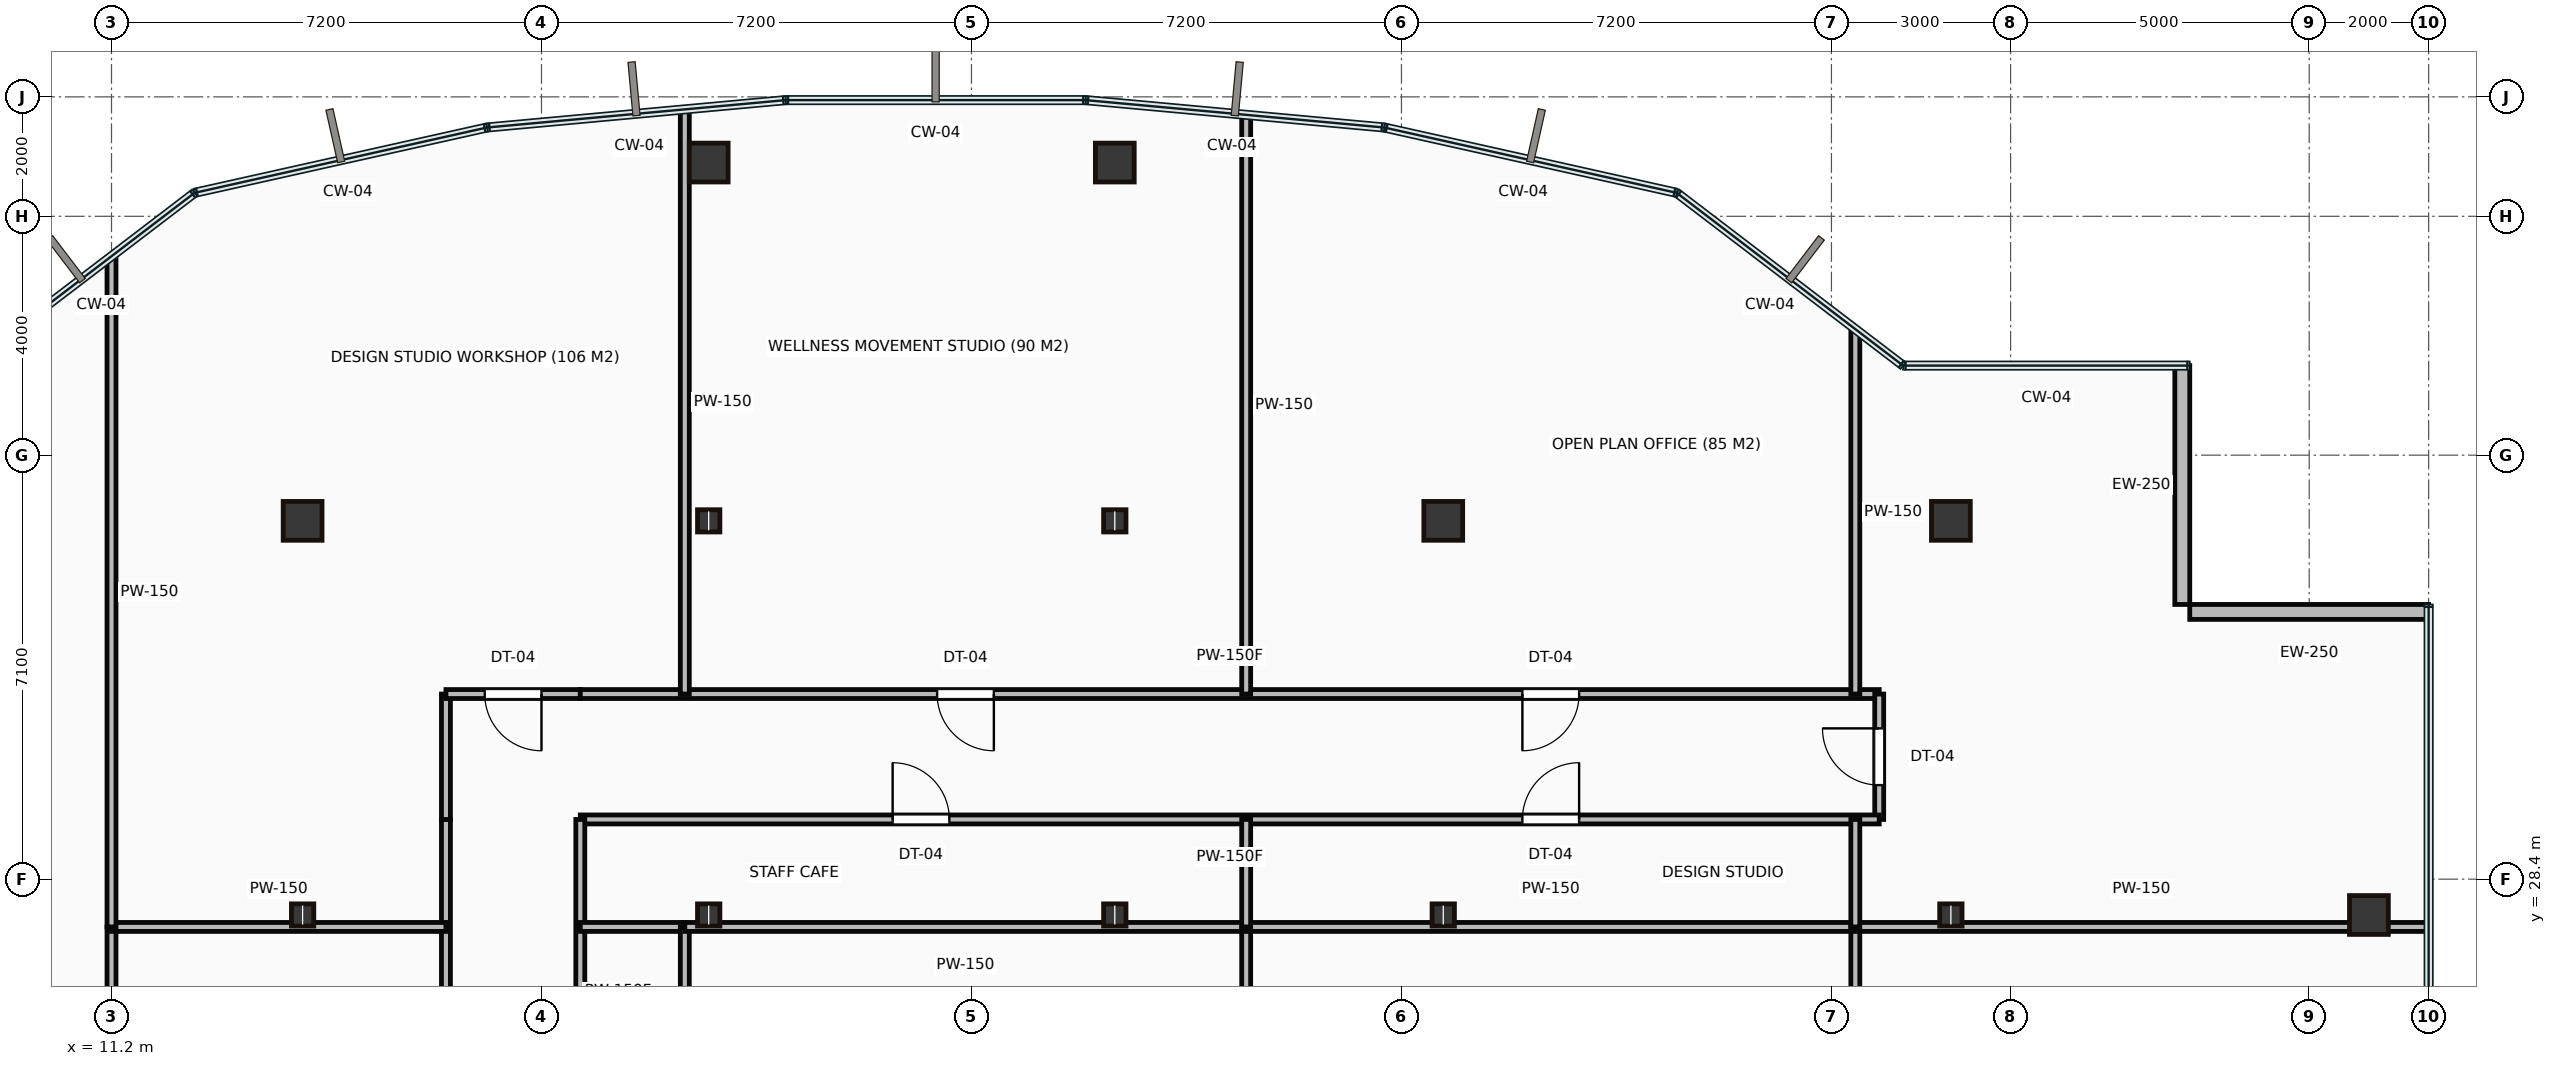
"""IFC4 building model, lengths in metres.
Left out: names, types, materials, properties, quantities, classifications, styles, units other than length and angle.
Written with IfcOpenShell. Run it as: python <this file> out.ifc"""

import sys

from ifc_helpers import new_model, si_unit, direction, frame, frame_2d, origin, origin_2d, place, context, subcontext, project, spatial, rectangle, hollow_rectangle, i_section, extrude, source, transform, mapped, element, fill, save


model = new_model("IFC4")
c1 = context("Model", 3, precision=1e-05, world=origin(), true_north=direction((0.0, 1.0)))
c2 = subcontext(c1, "Body", "Model", "MODEL_VIEW")
j1 = project(units=[si_unit("LENGTHUNIT", "METRE"), si_unit("PLANEANGLEUNIT", "RADIAN")], contexts=[c1])
p1 = place(None, origin())
s1 = spatial("IfcSite", under=j1, at=p1, CompositionType="ELEMENT")
p2 = place(p1, origin())
s2 = spatial("IfcBuilding", under=s1, at=p2, CompositionType="ELEMENT")
p3 = place(p2, frame((0.0, 0.0, 144.25)))
s3 = spatial("IfcBuildingStorey", under=s2, at=p3, CompositionType="ELEMENT", Elevation=144.25)
m1 = source(origin(), c2, "Body", "SweptSolid", [
    extrude(i_section(OverallWidth=0.374, OverallDepth=0.372, WebThickness=0.016, FlangeThickness=0.026, at=origin_2d()), origin(), (0.0, 0.0, 1.0), 3.65),
])
p4 = place(p3, frame((14.4, 27.8, 0.0), z_axis=(0.0, 0.0, 1.0), x_axis=(1.0, 0.0, 0.0)))
e1 = element("IfcColumn", 1, at=p4, inside=s3, PredefinedType="COLUMN", context=c2, shape_type="MappedRepresentation", body=[
    mapped(m1, transform((0.0, 0.0, 0.0))),
])
m2 = source(origin(), c2, "Body", "SweptSolid", [
    extrude(hollow_rectangle(XDim=0.65, YDim=0.65, WallThickness=0.032, at=origin_2d()), origin(), (0.0, 0.0, 1.0), 3.65),
])
p5 = place(p3, frame((14.4, 34.4, 0.0), z_axis=(0.0, 0.0, 1.0), x_axis=(1.0, 0.0, 0.0)))
e2 = element("IfcColumn", 2, at=p5, inside=s3, PredefinedType="COLUMN", context=c2, shape_type="MappedRepresentation", body=[
    mapped(m2, transform((0.0, 0.0, 0.0))),
])
for number, where, z_axis, x_axis in (
    (3, (21.2, 27.8, 0.0), (0.0, 0.0, 1.0), (1.0, 0.0, 0.0)),
    (4, (21.2, 34.4, 0.0), (0.0, 0.0, 1.0), (1.0, 0.0, 0.0)),
):
    element("IfcColumn", number, at=place(p3, frame(where, z_axis=z_axis, x_axis=x_axis)), inside=s3, PredefinedType="COLUMN", context=c2, shape_type="MappedRepresentation", body=[
        mapped(m1, transform((0.0, 0.0, 0.0))),
    ])
p6 = place(p3, frame((21.2, 40.4, 0.0), z_axis=(0.0, 0.0, 1.0), x_axis=(1.0, 0.0, 0.0)))
e5 = element("IfcColumn", 5, at=p6, inside=s3, PredefinedType="COLUMN", context=c2, shape_type="MappedRepresentation", body=[
    mapped(m2, transform((0.0, 0.0, 0.0))),
])
for number, where, z_axis, x_axis in (
    (6, (28.0, 27.8, 0.0), (0.0, 0.0, 1.0), (1.0, 0.0, 0.0)),
    (7, (28.0, 34.4, 0.0), (0.0, 0.0, 1.0), (1.0, 0.0, 0.0)),
):
    element("IfcColumn", number, at=place(p3, frame(where, z_axis=z_axis, x_axis=x_axis)), inside=s3, PredefinedType="COLUMN", context=c2, shape_type="MappedRepresentation", body=[
        mapped(m1, transform((0.0, 0.0, 0.0))),
    ])
p7 = place(p3, frame((28.0, 40.4, 0.0), z_axis=(0.0, 0.0, 1.0), x_axis=(1.0, 0.0, 0.0)))
e8 = element("IfcColumn", 8, at=p7, inside=s3, PredefinedType="COLUMN", context=c2, shape_type="MappedRepresentation", body=[
    mapped(m2, transform((0.0, 0.0, 0.0))),
])
p8 = place(p3, frame((33.5, 27.8, 0.0), z_axis=(0.0, 0.0, 1.0), x_axis=(1.0, 0.0, 0.0)))
e9 = element("IfcColumn", 9, at=p8, inside=s3, PredefinedType="COLUMN", context=c2, shape_type="MappedRepresentation", body=[
    mapped(m1, transform((0.0, 0.0, 0.0))),
])
p9 = place(p3, frame((33.5, 34.4, 0.0), z_axis=(0.0, 0.0, 1.0), x_axis=(1.0, 0.0, 0.0)))
e10 = element("IfcColumn", 10, at=p9, inside=s3, PredefinedType="COLUMN", context=c2, shape_type="MappedRepresentation", body=[
    mapped(m2, transform((0.0, 0.0, 0.0))),
])
p10 = place(p3, frame((42.0, 27.8, 0.0), z_axis=(0.0, 0.0, 1.0), x_axis=(1.0, 0.0, 0.0)))
e11 = element("IfcColumn", 11, at=p10, inside=s3, PredefinedType="COLUMN", context=c2, shape_type="MappedRepresentation", body=[
    mapped(m1, transform((0.0, 0.0, 0.0))),
])
for number, where, z_axis, x_axis in (
    (12, (42.0, 34.4, 0.0), (0.0, 0.0, 1.0), (1.0, 0.0, 0.0)),
    (13, (49.0, 27.8, 0.0), (0.0, 0.0, 1.0), (1.0, 0.0, 0.0)),
):
    element("IfcColumn", number, at=place(p3, frame(where, z_axis=z_axis, x_axis=x_axis)), inside=s3, PredefinedType="COLUMN", context=c2, shape_type="MappedRepresentation", body=[
        mapped(m2, transform((0.0, 0.0, 0.0))),
    ])
m3 = source(origin(), c2, "Body", "SweptSolid", [
    extrude(rectangle(XDim=4.0, YDim=0.25, at=frame_2d((2.0, 0.0))), origin(), (0.0, 0.0, 1.0), 3.4),
])
for number, where, z_axis, x_axis in (
    (14, (50.0, 32.875, 0.0), (0.0, 0.0, 1.0), (-1.0, 0.0, 0.0)),
    (15, (45.875, 33.0, 0.0), (0.0, 0.0, 1.0), (0.0, 1.0, 0.0)),
):
    element("IfcWall", number, at=place(p3, frame(where, z_axis=z_axis, x_axis=x_axis)), inside=s3, PredefinedType="STANDARD", context=c2, shape_type="MappedRepresentation", body=[
        mapped(m3, transform((0.0, 0.0, 0.0))),
    ])
m4 = source(origin(), c2, "Body", "SweptSolid", [
    extrude(rectangle(XDim=13.1, YDim=0.15, at=frame_2d((6.55, 0.0))), origin(), (0.0, 0.0, 1.0), 3.4),
])
p11 = place(p3, frame((16.8, 16.3, 0.0), z_axis=(0.0, 0.0, 1.0), x_axis=(0.0, 1.0, 0.0)))
e16 = element("IfcWall", 16, at=p11, inside=s3, PredefinedType="PARTITIONING", context=c2, shape_type="MappedRepresentation", body=[
    mapped(m4, transform((0.0, 0.0, 0.0))),
])
p12 = place(p11, frame((5.305, 0.0, 0.0)))
e17 = element("IfcOpeningElement", 17, at=p12, cuts=e16, PredefinedType="OPENING", context=c2, shape_type="SweptSolid", body=[
    extrude(rectangle(XDim=0.95, YDim=2.15, at=frame_2d((0.475, 1.075))), frame((0.0, 0.085, 0.0), z_axis=(0.0, -1.0, 0.0), x_axis=(1.0, 0.0, 0.0)), (0.0, 0.0, 1.0), 0.17),
])
m5 = source(origin(), c2, "Body", "SweptSolid", [
    extrude(rectangle(XDim=2.1, YDim=0.15, at=frame_2d((1.05, 0.0))), origin(), (0.0, 0.0, 1.0), 3.4),
])
p13 = place(p3, frame((16.8, 29.4, 0.0), z_axis=(0.0, 0.0, 1.0), x_axis=(0.0, 1.0, 0.0)))
e18 = element("IfcWall", 18, at=p13, inside=s3, PredefinedType="PARTITIONING", context=c2, shape_type="MappedRepresentation", body=[
    mapped(m5, transform((0.0, 0.0, 0.0))),
])
m6 = source(origin(), c2, "Body", "SweptSolid", [
    extrude(rectangle(XDim=2.25, YDim=0.15, at=frame_2d((1.125, 0.0))), origin(), (0.0, 0.0, 1.0), 3.4),
])
p14 = place(p3, frame((16.8, 31.5, 0.0), z_axis=(0.0, 0.0, 1.0), x_axis=(1.0, 0.0, 0.0)))
e19 = element("IfcWall", 19, at=p14, inside=s3, PredefinedType="PARTITIONING", context=c2, shape_type="MappedRepresentation", body=[
    mapped(m6, transform((0.0, 0.0, 0.0))),
])
p15 = place(p14, frame((0.65, 0.0, 0.0)))
e20 = element("IfcOpeningElement", 20, at=p15, cuts=e19, PredefinedType="OPENING", context=c2, shape_type="SweptSolid", body=[
    extrude(rectangle(XDim=0.95, YDim=2.15, at=frame_2d((0.475, 1.075))), frame((0.0, 0.085, 0.0), z_axis=(0.0, -1.0, 0.0), x_axis=(1.0, 0.0, 0.0)), (0.0, 0.0, 1.0), 0.17),
])
m7 = source(origin(), c2, "Body", "SweptSolid", [
    extrude(rectangle(XDim=21.75, YDim=0.15, at=frame_2d((10.875, 0.0))), origin(), (0.0, 0.0, 1.0), 3.4),
])
p16 = place(p3, frame((19.05, 31.5, 0.0), z_axis=(0.0, 0.0, 1.0), x_axis=(1.0, 0.0, 0.0)))
e21 = element("IfcWall", 21, at=p16, inside=s3, PredefinedType="PARTITIONING", context=c2, shape_type="MappedRepresentation", body=[
    mapped(m7, transform((0.0, 0.0, 0.0))),
])
p17 = place(p16, frame((5.975, 0.0, 0.0)))
e22 = element("IfcOpeningElement", 22, at=p17, cuts=e21, PredefinedType="OPENING", context=c2, shape_type="SweptSolid", body=[
    extrude(rectangle(XDim=0.95, YDim=2.15, at=frame_2d((0.475, 1.075))), frame((0.0, 0.085, 0.0), z_axis=(0.0, -1.0, 0.0), x_axis=(1.0, 0.0, 0.0)), (0.0, 0.0, 1.0), 0.17),
])
p18 = place(p16, frame((15.775, 0.0, 0.0)))
e23 = element("IfcOpeningElement", 23, at=p18, cuts=e21, PredefinedType="OPENING", context=c2, shape_type="SweptSolid", body=[
    extrude(rectangle(XDim=0.95, YDim=2.15, at=frame_2d((0.475, 1.075))), frame((0.0, 0.085, 0.0), z_axis=(0.0, -1.0, 0.0), x_axis=(1.0, 0.0, 0.0)), (0.0, 0.0, 1.0), 0.17),
])
p19 = place(p3, frame((40.8, 31.5, 0.0), z_axis=(0.0, 0.0, 1.0), x_axis=(0.0, -1.0, 0.0)))
e24 = element("IfcWall", 24, at=p19, inside=s3, PredefinedType="PARTITIONING", context=c2, shape_type="MappedRepresentation", body=[
    mapped(m5, transform((0.0, 0.0, 0.0))),
])
p20 = place(p19, frame((0.575, 0.0, 0.0)))
e25 = element("IfcOpeningElement", 25, at=p20, cuts=e24, PredefinedType="OPENING", context=c2, shape_type="SweptSolid", body=[
    extrude(rectangle(XDim=0.95, YDim=2.15, at=frame_2d((0.475, 1.075))), frame((0.0, 0.085, 0.0), z_axis=(0.0, -1.0, 0.0), x_axis=(1.0, 0.0, 0.0)), (0.0, 0.0, 1.0), 0.17),
])
p21 = place(p3, frame((40.8, 29.4, 0.0), z_axis=(0.0, 0.0, 1.0), x_axis=(-1.0, 0.0, 0.0)))
e26 = element("IfcWall", 26, at=p21, inside=s3, PredefinedType="PARTITIONING", context=c2, shape_type="MappedRepresentation", body=[
    mapped(m7, transform((0.0, 0.0, 0.0))),
])
p22 = place(p21, frame((15.57, 0.0, 0.0)))
e27 = element("IfcOpeningElement", 27, at=p22, cuts=e26, PredefinedType="OPENING", context=c2, shape_type="SweptSolid", body=[
    extrude(rectangle(XDim=0.95, YDim=2.15, at=frame_2d((0.475, 1.075))), frame((0.0, 0.085, 0.0), z_axis=(0.0, -1.0, 0.0), x_axis=(1.0, 0.0, 0.0)), (0.0, 0.0, 1.0), 0.17),
])
p23 = place(p21, frame((5.025, 0.0, 0.0)))
e28 = element("IfcOpeningElement", 28, at=p23, cuts=e26, PredefinedType="OPENING", context=c2, shape_type="SweptSolid", body=[
    extrude(rectangle(XDim=0.95, YDim=2.15, at=frame_2d((0.475, 1.075))), frame((0.0, 0.085, 0.0), z_axis=(0.0, -1.0, 0.0), x_axis=(1.0, 0.0, 0.0)), (0.0, 0.0, 1.0), 0.17),
])
p24 = place(p3, frame((19.05, 29.4, 0.0), z_axis=(0.0, 0.0, 1.0), x_axis=(0.0, -1.0, 0.0)))
e29 = element("IfcWall", 29, at=p24, inside=s3, PredefinedType="PARTITIONING", context=c2, shape_type="MappedRepresentation", body=[
    mapped(m4, transform((0.0, 0.0, 0.0))),
])
p25 = place(p24, frame((6.845, 0.0, 0.0)))
e30 = element("IfcOpeningElement", 30, at=p25, cuts=e29, PredefinedType="OPENING", context=c2, shape_type="SweptSolid", body=[
    extrude(rectangle(XDim=0.95, YDim=2.15, at=frame_2d((0.475, 1.075))), frame((0.0, 0.085, 0.0), z_axis=(0.0, -1.0, 0.0), x_axis=(1.0, 0.0, 0.0)), (0.0, 0.0, 1.0), 0.17),
])
m8 = source(origin(), c2, "Body", "SweptSolid", [
    extrude(rectangle(XDim=11.3, YDim=0.15, at=frame_2d((5.65, 0.0))), origin(), (0.0, 0.0, 1.0), 3.4),
])
p26 = place(p3, frame((11.2, 27.6, 0.0), z_axis=(0.0, 0.0, 1.0), x_axis=(0.0, -1.0, 0.0)))
e31 = element("IfcWall", 31, at=p26, inside=s3, PredefinedType="PARTITIONING", context=c2, shape_type="MappedRepresentation", body=[
    mapped(m8, transform((0.0, 0.0, 0.0))),
])
m9 = source(origin(), c2, "Body", "SweptSolid", [
    extrude(rectangle(XDim=5.6, YDim=0.15, at=frame_2d((2.8, 0.0))), origin(), (0.0, 0.0, 1.0), 3.4),
])
p27 = place(p3, frame((11.2, 27.6, 0.0), z_axis=(0.0, 0.0, 1.0), x_axis=(1.0, 0.0, 0.0)))
e32 = element("IfcWall", 32, at=p27, inside=s3, PredefinedType="PARTITIONING", context=c2, shape_type="MappedRepresentation", body=[
    mapped(m9, transform((0.0, 0.0, 0.0))),
])
m10 = source(origin(), c2, "Body", "SweptSolid", [
    extrude(rectangle(XDim=11.206, YDim=0.15, at=frame_2d((5.603, 0.0))), origin(), (0.0, 0.0, 1.0), 3.4),
])
p28 = place(p3, frame((11.2, 38.806, 0.0), z_axis=(0.0, 0.0, 1.0), x_axis=(0.0, -1.0, 0.0)))
e33 = element("IfcWall", 33, at=p28, inside=s3, PredefinedType="PARTITIONING", context=c2, shape_type="MappedRepresentation", body=[
    mapped(m10, transform((0.0, 0.0, 0.0))),
])
m11 = source(origin(), c2, "Body", "SweptSolid", [
    extrude(rectangle(XDim=1.75, YDim=0.15, at=frame_2d((0.875, 0.0))), origin(), (0.0, 0.0, 1.0), 3.4),
])
p29 = place(p3, frame((19.05, 27.6, 0.0), z_axis=(0.0, 0.0, 1.0), x_axis=(1.0, 0.0, 0.0)))
e34 = element("IfcWall", 34, at=p29, inside=s3, PredefinedType="PARTITIONING", context=c2, shape_type="MappedRepresentation", body=[
    mapped(m11, transform((0.0, 0.0, 0.0))),
])
p30 = place(p3, frame((20.8, 27.6, 0.0), z_axis=(0.0, 0.0, 1.0), x_axis=(0.0, -1.0, 0.0)))
e35 = element("IfcWall", 35, at=p30, inside=s3, PredefinedType="PARTITIONING", context=c2, shape_type="MappedRepresentation", body=[
    mapped(m8, transform((0.0, 0.0, 0.0))),
])
m12 = source(origin(), c2, "Body", "SweptSolid", [
    extrude(rectangle(XDim=9.4, YDim=0.15, at=frame_2d((4.7, 0.0))), origin(), (0.0, 0.0, 1.0), 3.4),
])
p31 = place(p3, frame((30.2, 27.6, 0.0), z_axis=(0.0, 0.0, 1.0), x_axis=(-1.0, 0.0, 0.0)))
e36 = element("IfcWall", 36, at=p31, inside=s3, PredefinedType="PARTITIONING", context=c2, shape_type="MappedRepresentation", body=[
    mapped(m12, transform((0.0, 0.0, 0.0))),
])
m13 = source(origin(), c2, "Body", "SweptSolid", [
    extrude(rectangle(XDim=9.771, YDim=0.15, at=frame_2d((4.885, 0.0))), origin(), (0.0, 0.0, 1.0), 3.4),
])
p32 = place(p3, frame((20.8, 41.271, 0.0), z_axis=(0.0, 0.0, 1.0), x_axis=(0.0, -1.0, 0.0)))
e37 = element("IfcWall", 37, at=p32, inside=s3, PredefinedType="PARTITIONING", context=c2, shape_type="MappedRepresentation", body=[
    mapped(m13, transform((0.0, 0.0, 0.0))),
])
p33 = place(p3, frame((30.2, 27.6, 0.0), z_axis=(0.0, 0.0, 1.0), x_axis=(0.0, -1.0, 0.0)))
e38 = element("IfcWall", 38, at=p33, inside=s3, PredefinedType="PARTITIONING", context=c2, shape_type="MappedRepresentation", body=[
    mapped(m8, transform((0.0, 0.0, 0.0))),
])
m14 = source(origin(), c2, "Body", "SweptSolid", [
    extrude(rectangle(XDim=10.2, YDim=0.15, at=frame_2d((5.1, 0.0))), origin(), (0.0, 0.0, 1.0), 3.4),
])
p34 = place(p3, frame((30.2, 27.6, 0.0), z_axis=(0.0, 0.0, 1.0), x_axis=(1.0, 0.0, 0.0)))
e39 = element("IfcWall", 39, at=p34, inside=s3, PredefinedType="PARTITIONING", context=c2, shape_type="MappedRepresentation", body=[
    mapped(m14, transform((0.0, 0.0, 0.0))),
])
m15 = source(origin(), c2, "Body", "SweptSolid", [
    extrude(rectangle(XDim=1.8, YDim=0.15, at=frame_2d((0.9, 0.0))), origin(), (0.0, 0.0, 1.0), 3.4),
])
p35 = place(p3, frame((30.2, 29.4, 0.0), z_axis=(0.0, 0.0, 1.0), x_axis=(0.0, -1.0, 0.0)))
e40 = element("IfcWall", 40, at=p35, inside=s3, PredefinedType="PARTITIONING", context=c2, shape_type="MappedRepresentation", body=[
    mapped(m15, transform((0.0, 0.0, 0.0))),
])
m16 = source(origin(), c2, "Body", "SweptSolid", [
    extrude(rectangle(XDim=9.679, YDim=0.15, at=frame_2d((4.839, 0.0))), origin(), (0.0, 0.0, 1.0), 3.4),
])
p36 = place(p3, frame((30.2, 41.179, 0.0), z_axis=(0.0, 0.0, 1.0), x_axis=(0.0, -1.0, 0.0)))
e41 = element("IfcWall", 41, at=p36, inside=s3, PredefinedType="PARTITIONING", context=c2, shape_type="MappedRepresentation", body=[
    mapped(m16, transform((0.0, 0.0, 0.0))),
])
p37 = place(p3, frame((40.4, 27.6, 0.0), z_axis=(0.0, 0.0, 1.0), x_axis=(0.0, -1.0, 0.0)))
e42 = element("IfcWall", 42, at=p37, inside=s3, PredefinedType="PARTITIONING", context=c2, shape_type="MappedRepresentation", body=[
    mapped(m8, transform((0.0, 0.0, 0.0))),
])
m17 = source(origin(), c2, "Body", "SweptSolid", [
    extrude(rectangle(XDim=9.58, YDim=0.15, at=frame_2d((4.79, 0.0))), origin(), (0.0, 0.0, 1.0), 3.4),
])
p38 = place(p3, frame((40.4, 27.6, 0.0), z_axis=(0.0, 0.0, 1.0), x_axis=(1.0, 0.0, 0.0)))
e43 = element("IfcWall", 43, at=p38, inside=s3, PredefinedType="PARTITIONING", context=c2, shape_type="MappedRepresentation", body=[
    mapped(m17, transform((0.0, 0.0, 0.0))),
])
p39 = place(p3, frame((40.4, 29.4, 0.0), z_axis=(0.0, 0.0, 1.0), x_axis=(0.0, -1.0, 0.0)))
e44 = element("IfcWall", 44, at=p39, inside=s3, PredefinedType="PARTITIONING", context=c2, shape_type="MappedRepresentation", body=[
    mapped(m15, transform((0.0, 0.0, 0.0))),
])
m18 = source(origin(), c2, "Body", "SweptSolid", [
    extrude(rectangle(XDim=6.085, YDim=0.15, at=frame_2d((3.043, 0.0))), origin(), (0.0, 0.0, 1.0), 3.4),
])
p40 = place(p3, frame((40.4, 37.585, 0.0), z_axis=(0.0, 0.0, 1.0), x_axis=(0.0, -1.0, 0.0)))
e45 = element("IfcWall", 45, at=p40, inside=s3, PredefinedType="PARTITIONING", context=c2, shape_type="MappedRepresentation", body=[
    mapped(m18, transform((0.0, 0.0, 0.0))),
])
m19 = source(origin(), c2, "Body", "SweptSolid", [
    extrude(rectangle(XDim=0.95, YDim=2.15, at=frame_2d((0.475, 1.075))), frame((0.0, 0.025, 0.0), z_axis=(0.0, -1.0, 0.0), x_axis=(1.0, 0.0, 0.0)), (0.0, 0.0, 1.0), 0.05),
])
p41 = place(p15, origin())
e46 = element("IfcDoor", 46, at=p41, inside=s3, OperationType="SINGLE_SWING_RIGHT", PredefinedType="DOOR", context=c2, shape_type="MappedRepresentation", body=[
    mapped(m19, transform((0.0, 0.0, 0.0))),
])
fill(e20, e46)
p42 = place(p22, origin())
e47 = element("IfcDoor", 47, at=p42, inside=s3, OperationType="SINGLE_SWING_RIGHT", PredefinedType="DOOR", context=c2, shape_type="MappedRepresentation", body=[
    mapped(m19, transform((0.0, 0.0, 0.0))),
])
fill(e27, e47)
p43 = place(p17, origin())
e48 = element("IfcDoor", 48, at=p43, inside=s3, OperationType="SINGLE_SWING_RIGHT", PredefinedType="DOOR", context=c2, shape_type="MappedRepresentation", body=[
    mapped(m19, transform((0.0, 0.0, 0.0))),
])
fill(e22, e48)
p44 = place(p18, origin())
e49 = element("IfcDoor", 49, at=p44, inside=s3, OperationType="SINGLE_SWING_LEFT", PredefinedType="DOOR", context=c2, shape_type="MappedRepresentation", body=[
    mapped(m19, transform((0.0, 0.0, 0.0))),
])
fill(e23, e49)
p45 = place(p23, origin())
e50 = element("IfcDoor", 50, at=p45, inside=s3, OperationType="SINGLE_SWING_LEFT", PredefinedType="DOOR", context=c2, shape_type="MappedRepresentation", body=[
    mapped(m19, transform((0.0, 0.0, 0.0))),
])
fill(e28, e50)
p46 = place(p20, origin())
e51 = element("IfcDoor", 51, at=p46, inside=s3, OperationType="SINGLE_SWING_LEFT", PredefinedType="DOOR", context=c2, shape_type="MappedRepresentation", body=[
    mapped(m19, transform((0.0, 0.0, 0.0))),
])
fill(e25, e51)
save(model, sys.argv[1])
